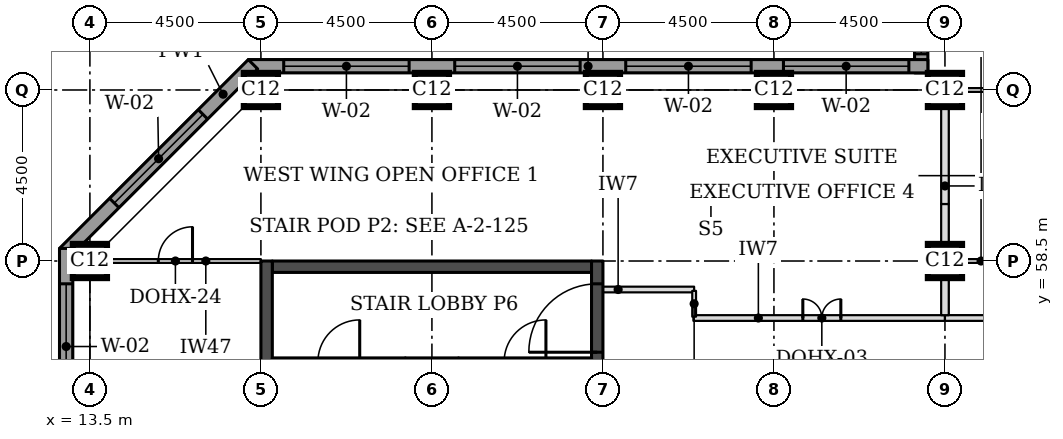
"""IFC4 building model, lengths in metres.
Left out: names, types, materials, properties, quantities, classifications, styles, units other than length and angle.
Written with IfcOpenShell. Run it as: python <this file> out.ifc"""

import sys

from ifc_helpers import new_model, si_unit, direction, frame, frame_2d, origin, origin_2d, place, context, subcontext, project, spatial, rectangle, extrude, element, fill, save


model = new_model("IFC4")
c1 = context("Model", 3, precision=1e-05, world=origin(), true_north=direction((0.0, 1.0)))
c2 = subcontext(c1, "Body", "Model", "MODEL_VIEW")
j1 = project(units=[si_unit("LENGTHUNIT", "METRE"), si_unit("PLANEANGLEUNIT", "RADIAN")], contexts=[c1])
p1 = place(None, origin())
s1 = spatial("IfcSite", under=j1, at=p1, CompositionType="ELEMENT")
p2 = place(p1, origin())
s2 = spatial("IfcBuilding", under=s1, at=p2, CompositionType="ELEMENT")
p3 = place(p2, frame((0.0, 0.0, 256.3)))
s3 = spatial("IfcBuildingStorey", under=s2, at=p3, CompositionType="ELEMENT", Elevation=256.3)
for number, where, z_axis, x_axis in (
    (1, (13.5, 58.5, 0.0), (0.0, 0.0, 1.0), (1.0, 0.0, 0.0)),
    (2, (36.0, 58.5, 0.0), (0.0, 0.0, 1.0), (1.0, 0.0, 0.0)),
    (3, (18.0, 63.0, 0.0), (0.0, 0.0, 1.0), (1.0, 0.0, 0.0)),
    (4, (22.5, 63.0, 0.0), (0.0, 0.0, 1.0), (1.0, 0.0, 0.0)),
    (5, (27.0, 63.0, 0.0), (0.0, 0.0, 1.0), (1.0, 0.0, 0.0)),
    (6, (31.5, 63.0, 0.0), (0.0, 0.0, 1.0), (1.0, 0.0, 0.0)),
    (7, (36.0, 63.0, 0.0), (0.0, 0.0, 1.0), (1.0, 0.0, 0.0)),
):
    element("IfcColumn", number, at=place(p3, frame(where, z_axis=z_axis, x_axis=x_axis)), inside=s3, PredefinedType="COLUMN", context=c2, shape_type="SweptSolid", body=[
        extrude(rectangle(XDim=0.9, YDim=0.9, at=origin_2d()), origin(), (0.0, 0.0, 1.0), 3.7),
    ])
p4 = place(p3, frame((18.3, 58.35, 0.0), z_axis=(0.0, 0.0, 1.0), x_axis=(1.0, 0.0, 0.0)))
e8 = element("IfcWall", 8, at=p4, inside=s3, PredefinedType="SHEAR", context=c2, shape_type="SweptSolid", body=[
    extrude(rectangle(XDim=8.4, YDim=0.3, at=frame_2d((4.2, 0.0))), origin(), (0.0, 0.0, 1.0), 3.7),
])
p5 = place(p3, frame((18.15, 49.5, 0.0), z_axis=(0.0, 0.0, 1.0), x_axis=(0.0, 1.0, 0.0)))
e9 = element("IfcWall", 9, at=p5, inside=s3, PredefinedType="SHEAR", context=c2, shape_type="SweptSolid", body=[
    extrude(rectangle(XDim=9.0, YDim=0.3, at=frame_2d((4.5, 0.0))), origin(), (0.0, 0.0, 1.0), 3.7),
])
p6 = place(p3, frame((26.85, 49.5, 0.0), z_axis=(0.0, 0.0, 1.0), x_axis=(0.0, 1.0, 0.0)))
e10 = element("IfcWall", 10, at=p6, inside=s3, PredefinedType="SHEAR", context=c2, shape_type="SweptSolid", body=[
    extrude(rectangle(XDim=9.0, YDim=0.3, at=frame_2d((4.5, 0.0))), origin(), (0.0, 0.0, 1.0), 3.7),
])
p7 = place(p6, frame((6.6, 0.0, 0.0)))
e11 = element("IfcOpeningElement", 11, at=p7, cuts=e10, PredefinedType="OPENING", context=c2, shape_type="SweptSolid", body=[
    extrude(rectangle(XDim=1.8, YDim=2.1, at=frame_2d((0.9, 1.05))), frame((0.0, 0.16, 0.0), z_axis=(0.0, -1.0, 0.0), x_axis=(1.0, 0.0, 0.0)), (0.0, 0.0, 1.0), 0.32),
])
p8 = place(p3, frame((35.375, 76.831, 0.0), z_axis=(0.0, 0.0, 1.0), x_axis=(0.0, -1.0, 0.0)))
e12 = element("IfcWall", 12, at=p8, inside=s3, PredefinedType="STANDARD", context=c2, shape_type="SweptSolid", body=[
    extrude(rectangle(XDim=13.381, YDim=0.35, at=frame_2d((6.691, 0.0))), origin(), (0.0, 0.0, 1.0), 3.525),
])
p9 = place(p8, frame((0.931, 0.0, 0.9)))
e13 = element("IfcOpeningElement", 13, at=p9, cuts=e12, PredefinedType="OPENING", context=c2, shape_type="SweptSolid", body=[
    extrude(rectangle(XDim=3.3, YDim=1.9, at=frame_2d((1.65, 0.95))), frame((0.0, 0.185, 0.0), z_axis=(0.0, -1.0, 0.0), x_axis=(1.0, 0.0, 0.0)), (0.0, 0.0, 1.0), 0.37),
])
p10 = place(p8, frame((5.431, 0.0, 0.9)))
e14 = element("IfcOpeningElement", 14, at=p10, cuts=e12, PredefinedType="OPENING", context=c2, shape_type="SweptSolid", body=[
    extrude(rectangle(XDim=3.3, YDim=1.9, at=frame_2d((1.65, 0.95))), frame((0.0, 0.185, 0.0), z_axis=(0.0, -1.0, 0.0), x_axis=(1.0, 0.0, 0.0)), (0.0, 0.0, 1.0), 0.37),
])
p11 = place(p8, frame((9.581, 0.0, 0.9)))
e15 = element("IfcOpeningElement", 15, at=p11, cuts=e12, PredefinedType="OPENING", context=c2, shape_type="SweptSolid", body=[
    extrude(rectangle(XDim=3.3, YDim=1.9, at=frame_2d((1.65, 0.95))), frame((0.0, 0.185, 0.0), z_axis=(0.0, -1.0, 0.0), x_axis=(1.0, 0.0, 0.0)), (0.0, 0.0, 1.0), 0.37),
])
p12 = place(p3, frame((35.55, 63.625, 0.0), z_axis=(0.0, 0.0, 1.0), x_axis=(-1.0, 0.0, 0.0)))
e16 = element("IfcWall", 16, at=p12, inside=s3, PredefinedType="STANDARD", context=c2, shape_type="SweptSolid", body=[
    extrude(rectangle(XDim=17.881, YDim=0.35, at=frame_2d((8.941, 0.0))), origin(), (0.0, 0.0, 1.0), 3.525),
])
p13 = place(p12, frame((0.5, 0.0, 0.9)))
e17 = element("IfcOpeningElement", 17, at=p13, cuts=e16, PredefinedType="OPENING", context=c2, shape_type="SweptSolid", body=[
    extrude(rectangle(XDim=3.3, YDim=1.9, at=frame_2d((1.65, 0.95))), frame((0.0, 0.185, 0.0), z_axis=(0.0, -1.0, 0.0), x_axis=(1.0, 0.0, 0.0)), (0.0, 0.0, 1.0), 0.37),
])
p14 = place(p12, frame((4.65, 0.0, 0.9)))
e18 = element("IfcOpeningElement", 18, at=p14, cuts=e16, PredefinedType="OPENING", context=c2, shape_type="SweptSolid", body=[
    extrude(rectangle(XDim=3.3, YDim=1.9, at=frame_2d((1.65, 0.95))), frame((0.0, 0.185, 0.0), z_axis=(0.0, -1.0, 0.0), x_axis=(1.0, 0.0, 0.0)), (0.0, 0.0, 1.0), 0.37),
])
p15 = place(p12, frame((9.15, 0.0, 0.9)))
e19 = element("IfcOpeningElement", 19, at=p15, cuts=e16, PredefinedType="OPENING", context=c2, shape_type="SweptSolid", body=[
    extrude(rectangle(XDim=3.3, YDim=1.9, at=frame_2d((1.65, 0.95))), frame((0.0, 0.185, 0.0), z_axis=(0.0, -1.0, 0.0), x_axis=(1.0, 0.0, 0.0)), (0.0, 0.0, 1.0), 0.37),
])
p16 = place(p12, frame((13.65, 0.0, 0.9)))
e20 = element("IfcOpeningElement", 20, at=p16, cuts=e16, PredefinedType="OPENING", context=c2, shape_type="SweptSolid", body=[
    extrude(rectangle(XDim=3.3, YDim=1.9, at=frame_2d((1.65, 0.95))), frame((0.0, 0.185, 0.0), z_axis=(0.0, -1.0, 0.0), x_axis=(1.0, 0.0, 0.0)), (0.0, 0.0, 1.0), 0.37),
])
p17 = place(p3, frame((17.792, 63.676, 0.0), z_axis=(0.0, 0.0, 1.0), x_axis=(-0.707106781187, -0.707106781187, 0.0)))
e21 = element("IfcWall", 21, at=p17, inside=s3, PredefinedType="STANDARD", context=c2, shape_type="SweptSolid", body=[
    extrude(rectangle(XDim=7.027, YDim=0.35, at=frame_2d((3.513, 0.0))), origin(), (0.0, 0.0, 1.0), 3.525),
])
p18 = place(p17, frame((1.863, 0.0, 0.9)))
e22 = element("IfcOpeningElement", 22, at=p18, cuts=e21, PredefinedType="OPENING", context=c2, shape_type="SweptSolid", body=[
    extrude(rectangle(XDim=3.3, YDim=1.9, at=frame_2d((1.65, 0.95))), frame((0.0, 0.185, 0.0), z_axis=(0.0, -1.0, 0.0), x_axis=(1.0, 0.0, 0.0)), (0.0, 0.0, 1.0), 0.37),
])
p19 = place(p3, frame((12.875, 58.831, 0.0), z_axis=(0.0, 0.0, 1.0), x_axis=(0.0, -1.0, 0.0)))
e23 = element("IfcWall", 23, at=p19, inside=s3, PredefinedType="STANDARD", context=c2, shape_type="SweptSolid", body=[
    extrude(rectangle(XDim=14.163, YDim=0.35, at=frame_2d((7.081, 0.0))), origin(), (0.0, 0.0, 1.0), 3.525),
])
p20 = place(p19, frame((0.931, 0.0, 0.9)))
e24 = element("IfcOpeningElement", 24, at=p20, cuts=e23, PredefinedType="OPENING", context=c2, shape_type="SweptSolid", body=[
    extrude(rectangle(XDim=3.3, YDim=1.9, at=frame_2d((1.65, 0.95))), frame((0.0, 0.185, 0.0), z_axis=(0.0, -1.0, 0.0), x_axis=(1.0, 0.0, 0.0)), (0.0, 0.0, 1.0), 0.37),
])
p21 = place(p19, frame((5.431, 0.0, 0.9)))
e25 = element("IfcOpeningElement", 25, at=p21, cuts=e23, PredefinedType="OPENING", context=c2, shape_type="SweptSolid", body=[
    extrude(rectangle(XDim=3.3, YDim=1.9, at=frame_2d((1.65, 0.95))), frame((0.0, 0.185, 0.0), z_axis=(0.0, -1.0, 0.0), x_axis=(1.0, 0.0, 0.0)), (0.0, 0.0, 1.0), 0.37),
])
p22 = place(p19, frame((9.931, 0.0, 0.9)))
e26 = element("IfcOpeningElement", 26, at=p22, cuts=e23, PredefinedType="OPENING", context=c2, shape_type="SweptSolid", body=[
    extrude(rectangle(XDim=3.3, YDim=1.9, at=frame_2d((1.65, 0.95))), frame((0.0, 0.185, 0.0), z_axis=(0.0, -1.0, 0.0), x_axis=(1.0, 0.0, 0.0)), (0.0, 0.0, 1.0), 0.37),
])
p23 = place(p3, frame((29.38, 57.0, 0.0), z_axis=(0.0, 0.0, 1.0), x_axis=(1.0, 0.0, 0.0)))
e27 = element("IfcWall", 27, at=p23, inside=s3, PredefinedType="PARTITIONING", context=c2, shape_type="SweptSolid", body=[
    extrude(rectangle(XDim=6.62, YDim=0.15, at=frame_2d((3.31, 0.0))), origin(), (0.0, 0.0, 1.0), 3.55),
])
p24 = place(p23, frame((2.88, 0.0, 0.0)))
e28 = element("IfcOpeningElement", 28, at=p24, cuts=e27, PredefinedType="OPENING", context=c2, shape_type="SweptSolid", body=[
    extrude(rectangle(XDim=1.0, YDim=2.1, at=frame_2d((0.5, 1.05))), frame((0.0, 0.085, 0.0), z_axis=(0.0, -1.0, 0.0), x_axis=(1.0, 0.0, 0.0)), (0.0, 0.0, 1.0), 0.17),
])
p25 = place(p3, frame((36.0, 57.0, 0.0), z_axis=(0.0, 0.0, 1.0), x_axis=(1.0, 0.0, 0.0)))
e29 = element("IfcWall", 29, at=p25, inside=s3, PredefinedType="PARTITIONING", context=c2, shape_type="SweptSolid", body=[
    extrude(rectangle(XDim=6.075, YDim=0.15, at=frame_2d((3.038, 0.0))), origin(), (0.0, 0.0, 1.0), 3.55),
])
p26 = place(p25, frame((2.55, 0.0, 0.0)))
e30 = element("IfcOpeningElement", 30, at=p26, cuts=e29, PredefinedType="OPENING", context=c2, shape_type="SweptSolid", body=[
    extrude(rectangle(XDim=1.0, YDim=2.1, at=frame_2d((0.5, 1.05))), frame((0.0, 0.085, 0.0), z_axis=(0.0, -1.0, 0.0), x_axis=(1.0, 0.0, 0.0)), (0.0, 0.0, 1.0), 0.17),
])
p27 = place(p3, frame((36.45, 58.5, 0.0), z_axis=(0.0, 0.0, 1.0), x_axis=(1.0, 0.0, 0.0)))
e31 = element("IfcWall", 31, at=p27, inside=s3, PredefinedType="PARTITIONING", context=c2, shape_type="SweptSolid", body=[
    extrude(rectangle(XDim=2.6, YDim=0.1, at=frame_2d((1.3, 0.0))), origin(), (0.0, 0.0, 1.0), 3.55),
])
p28 = place(p27, frame((0.85, 0.0, 0.0)))
e32 = element("IfcOpeningElement", 32, at=p28, cuts=e31, PredefinedType="OPENING", context=c2, shape_type="SweptSolid", body=[
    extrude(rectangle(XDim=0.9, YDim=2.1, at=frame_2d((0.45, 1.05))), frame((0.0, 0.06, 0.0), z_axis=(0.0, -1.0, 0.0), x_axis=(1.0, 0.0, 0.0)), (0.0, 0.0, 1.0), 0.12),
])
p29 = place(p3, frame((36.45, 63.0, 0.0), z_axis=(0.0, 0.0, 1.0), x_axis=(1.0, 0.0, 0.0)))
e33 = element("IfcWall", 33, at=p29, inside=s3, PredefinedType="PARTITIONING", context=c2, shape_type="SweptSolid", body=[
    extrude(rectangle(XDim=2.5, YDim=0.1, at=frame_2d((1.25, 0.0))), origin(), (0.0, 0.0, 1.0), 3.55),
])
p30 = place(p3, frame((36.0, 57.075, 0.0), z_axis=(0.0, 0.0, 1.0), x_axis=(0.0, 1.0, 0.0)))
e34 = element("IfcWall", 34, at=p30, inside=s3, PredefinedType="PARTITIONING", context=c2, shape_type="SweptSolid", body=[
    extrude(rectangle(XDim=0.975, YDim=0.2, at=frame_2d((0.488, 0.0))), origin(), (0.0, 0.0, 1.0), 2.8),
])
p31 = place(p3, frame((36.0, 58.92, 0.0), z_axis=(0.0, 0.0, 1.0), x_axis=(0.0, 1.0, 0.0)))
e35 = element("IfcWall", 35, at=p31, inside=s3, PredefinedType="PARTITIONING", context=c2, shape_type="SweptSolid", body=[
    extrude(rectangle(XDim=1.08, YDim=0.2, at=frame_2d((0.54, 0.0))), origin(), (0.0, 0.0, 1.0), 2.8),
])
p32 = place(p3, frame((36.0, 60.0, 0.0), z_axis=(0.0, 0.0, 1.0), x_axis=(0.0, 1.0, 0.0)))
e36 = element("IfcWall", 36, at=p32, inside=s3, PredefinedType="PARTITIONING", context=c2, shape_type="SweptSolid", body=[
    extrude(rectangle(XDim=2.55, YDim=0.2, at=frame_2d((1.275, 0.0))), origin(), (0.0, 0.0, 1.0), 2.8),
])
p33 = place(p3, frame((13.5, 58.5, 0.0), z_axis=(0.0, 0.0, 1.0), x_axis=(1.0, 0.0, 0.0)))
e37 = element("IfcWall", 37, at=p33, inside=s3, PredefinedType="PARTITIONING", context=c2, shape_type="SweptSolid", body=[
    extrude(rectangle(XDim=4.5, YDim=0.1, at=frame_2d((2.25, 0.0))), origin(), (0.0, 0.0, 1.0), 2.55),
])
p34 = place(p33, frame((1.8, 0.0, 0.0)))
e38 = element("IfcOpeningElement", 38, at=p34, cuts=e37, PredefinedType="OPENING", context=c2, shape_type="SweptSolid", body=[
    extrude(rectangle(XDim=0.9, YDim=2.1, at=frame_2d((0.45, 1.05))), frame((0.0, 0.06, 0.0), z_axis=(0.0, -1.0, 0.0), x_axis=(1.0, 0.0, 0.0)), (0.0, 0.0, 1.0), 0.12),
])
p35 = place(p3, frame((27.0, 57.75, 0.0), z_axis=(0.0, 0.0, 1.0), x_axis=(1.0, 0.0, 0.0)))
e39 = element("IfcWall", 39, at=p35, inside=s3, PredefinedType="PARTITIONING", context=c2, shape_type="SweptSolid", body=[
    extrude(rectangle(XDim=2.4, YDim=0.15, at=frame_2d((1.2, 0.0))), origin(), (0.0, 0.0, 1.0), 3.55),
])
p36 = place(p3, frame((29.4, 57.715, 0.0), z_axis=(0.0, 0.0, 1.0), x_axis=(0.0, -1.0, 0.0)))
e40 = element("IfcWall", 40, at=p36, inside=s3, PredefinedType="PARTITIONING", context=c2, shape_type="SweptSolid", body=[
    extrude(rectangle(XDim=0.68, YDim=0.1, at=frame_2d((0.34, 0.0))), origin(), (0.0, 0.0, 1.0), 3.55),
])
p37 = place(p3, frame((21.8, 55.85, 0.0), z_axis=(0.0, 0.0, 1.0), x_axis=(1.0, 0.0, 0.0)))
e41 = element("IfcWall", 41, at=p37, inside=s3, PredefinedType="SOLIDWALL", context=c2, shape_type="SweptSolid", body=[
    extrude(rectangle(XDim=1.4, YDim=0.2, at=frame_2d((0.7, 0.0))), origin(), (0.0, 0.0, 1.0), 3.55),
])
p38 = place(p3, frame((18.3, 55.85, 0.0), z_axis=(0.0, 0.0, 1.0), x_axis=(1.0, 0.0, 0.0)))
e42 = element("IfcWall", 42, at=p38, inside=s3, PredefinedType="SOLIDWALL", context=c2, shape_type="SweptSolid", body=[
    extrude(rectangle(XDim=3.5, YDim=0.2, at=frame_2d((1.75, 0.0))), origin(), (0.0, 0.0, 1.0), 3.55),
])
p39 = place(p38, frame((1.2, 0.0, 0.0)))
e43 = element("IfcOpeningElement", 43, at=p39, cuts=e42, PredefinedType="OPENING", context=c2, shape_type="SweptSolid", body=[
    extrude(rectangle(XDim=1.1, YDim=2.1, at=frame_2d((0.55, 1.05))), frame((0.0, 0.11, 0.0), z_axis=(0.0, -1.0, 0.0), x_axis=(1.0, 0.0, 0.0)), (0.0, 0.0, 1.0), 0.22),
])
p40 = place(p3, frame((23.2, 55.85, 0.0), z_axis=(0.0, 0.0, 1.0), x_axis=(1.0, 0.0, 0.0)))
e44 = element("IfcWall", 44, at=p40, inside=s3, PredefinedType="SOLIDWALL", context=c2, shape_type="SweptSolid", body=[
    extrude(rectangle(XDim=3.5, YDim=0.2, at=frame_2d((1.75, 0.0))), origin(), (0.0, 0.0, 1.0), 3.55),
])
p41 = place(p40, frame((1.2, 0.0, 0.0)))
e45 = element("IfcOpeningElement", 45, at=p41, cuts=e44, PredefinedType="OPENING", context=c2, shape_type="SweptSolid", body=[
    extrude(rectangle(XDim=1.1, YDim=2.1, at=frame_2d((0.55, 1.05))), frame((0.0, 0.11, 0.0), z_axis=(0.0, -1.0, 0.0), x_axis=(1.0, 0.0, 0.0)), (0.0, 0.0, 1.0), 0.22),
])
p42 = place(p11, origin())
e46 = element("IfcWindow", 46, at=p42, inside=s3, PartitioningType="SINGLE_PANEL", PredefinedType="WINDOW", context=c2, shape_type="SweptSolid", body=[
    extrude(rectangle(XDim=3.3, YDim=1.9, at=frame_2d((1.65, 0.95))), frame((0.0, 0.085, 0.0), z_axis=(0.0, -1.0, 0.0), x_axis=(1.0, 0.0, 0.0)), (0.0, 0.0, 1.0), 0.06),
])
fill(e15, e46)
p43 = place(p13, origin())
e47 = element("IfcWindow", 47, at=p43, inside=s3, PartitioningType="SINGLE_PANEL", PredefinedType="WINDOW", context=c2, shape_type="SweptSolid", body=[
    extrude(rectangle(XDim=3.3, YDim=1.9, at=frame_2d((1.65, 0.95))), frame((0.0, 0.085, 0.0), z_axis=(0.0, -1.0, 0.0), x_axis=(1.0, 0.0, 0.0)), (0.0, 0.0, 1.0), 0.06),
])
fill(e17, e47)
p44 = place(p14, origin())
e48 = element("IfcWindow", 48, at=p44, inside=s3, PartitioningType="SINGLE_PANEL", PredefinedType="WINDOW", context=c2, shape_type="SweptSolid", body=[
    extrude(rectangle(XDim=3.3, YDim=1.9, at=frame_2d((1.65, 0.95))), frame((0.0, 0.085, 0.0), z_axis=(0.0, -1.0, 0.0), x_axis=(1.0, 0.0, 0.0)), (0.0, 0.0, 1.0), 0.06),
])
fill(e18, e48)
p45 = place(p15, origin())
e49 = element("IfcWindow", 49, at=p45, inside=s3, PartitioningType="SINGLE_PANEL", PredefinedType="WINDOW", context=c2, shape_type="SweptSolid", body=[
    extrude(rectangle(XDim=3.3, YDim=1.9, at=frame_2d((1.65, 0.95))), frame((0.0, 0.085, 0.0), z_axis=(0.0, -1.0, 0.0), x_axis=(1.0, 0.0, 0.0)), (0.0, 0.0, 1.0), 0.06),
])
fill(e19, e49)
p46 = place(p16, origin())
e50 = element("IfcWindow", 50, at=p46, inside=s3, PartitioningType="SINGLE_PANEL", PredefinedType="WINDOW", context=c2, shape_type="SweptSolid", body=[
    extrude(rectangle(XDim=3.3, YDim=1.9, at=frame_2d((1.65, 0.95))), frame((0.0, 0.085, 0.0), z_axis=(0.0, -1.0, 0.0), x_axis=(1.0, 0.0, 0.0)), (0.0, 0.0, 1.0), 0.06),
])
fill(e20, e50)
p47 = place(p18, origin())
e51 = element("IfcWindow", 51, at=p47, inside=s3, PartitioningType="SINGLE_PANEL", PredefinedType="WINDOW", context=c2, shape_type="SweptSolid", body=[
    extrude(rectangle(XDim=3.3, YDim=1.9, at=frame_2d((1.65, 0.95))), frame((0.0, 0.085, 0.0), z_axis=(0.0, -1.0, 0.0), x_axis=(1.0, 0.0, 0.0)), (0.0, 0.0, 1.0), 0.06),
])
fill(e22, e51)
p48 = place(p20, origin())
e52 = element("IfcWindow", 52, at=p48, inside=s3, PartitioningType="SINGLE_PANEL", PredefinedType="WINDOW", context=c2, shape_type="SweptSolid", body=[
    extrude(rectangle(XDim=3.3, YDim=1.9, at=frame_2d((1.65, 0.95))), frame((0.0, 0.085, 0.0), z_axis=(0.0, -1.0, 0.0), x_axis=(1.0, 0.0, 0.0)), (0.0, 0.0, 1.0), 0.06),
])
fill(e24, e52)
p49 = place(p24, origin())
e53 = element("IfcDoor", 53, at=p49, inside=s3, OperationType="DOUBLE_DOOR_SINGLE_SWING", PredefinedType="DOOR", context=c2, shape_type="SweptSolid", body=[
    extrude(rectangle(XDim=1.0, YDim=2.1, at=frame_2d((0.5, 1.05))), frame((0.0, 0.025, 0.0), z_axis=(0.0, -1.0, 0.0), x_axis=(1.0, 0.0, 0.0)), (0.0, 0.0, 1.0), 0.05),
])
fill(e28, e53)
p50 = place(p34, origin())
e54 = element("IfcDoor", 54, at=p50, inside=s3, OperationType="SINGLE_SWING_RIGHT", PredefinedType="DOOR", context=c2, shape_type="SweptSolid", body=[
    extrude(rectangle(XDim=0.9, YDim=2.1, at=frame_2d((0.45, 1.05))), frame((0.0, 0.025, 0.0), z_axis=(0.0, -1.0, 0.0), x_axis=(1.0, 0.0, 0.0)), (0.0, 0.0, 1.0), 0.05),
])
fill(e38, e54)
p51 = place(p7, origin())
e55 = element("IfcDoor", 55, at=p51, inside=s3, OperationType="SINGLE_SWING_LEFT", PredefinedType="DOOR", context=c2, shape_type="SweptSolid", body=[
    extrude(rectangle(XDim=1.8, YDim=2.1, at=frame_2d((0.9, 1.05))), frame((0.0, 0.025, 0.0), z_axis=(0.0, -1.0, 0.0), x_axis=(1.0, 0.0, 0.0)), (0.0, 0.0, 1.0), 0.05),
])
fill(e11, e55)
save(model, sys.argv[1])
